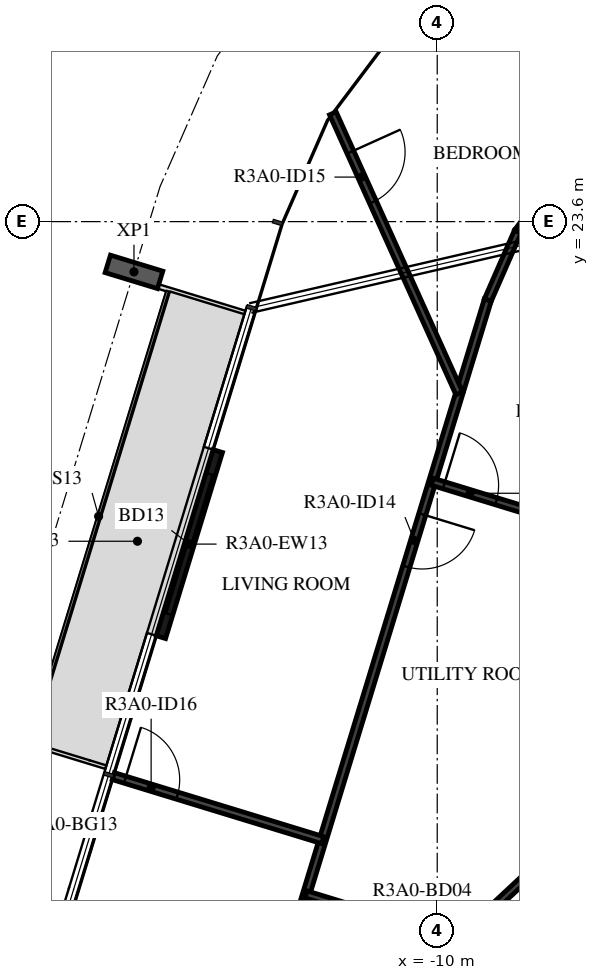
"""IFC4 building model, lengths in metres.
Left out: names, types, materials, properties, quantities, classifications, styles, units other than length and angle.
Written with IfcOpenShell. Run it as: python <this file> out.ifc"""

import sys

from ifc_helpers import new_model, si_unit, direction, frame, frame_2d, origin, origin_2d, place, context, subcontext, project, spatial, rectangle, i_section, extrude, element, fill, save


model = new_model("IFC4")
c1 = context("Model", 3, precision=1e-05, world=origin(), true_north=direction((0.0, 1.0)))
c2 = subcontext(c1, "Body", "Model", "MODEL_VIEW")
j1 = project(units=[si_unit("LENGTHUNIT", "METRE"), si_unit("PLANEANGLEUNIT", "RADIAN")], contexts=[c1])
p1 = place(None, origin())
s1 = spatial("IfcSite", under=j1, at=p1, CompositionType="ELEMENT")
p2 = place(p1, origin())
s2 = spatial("IfcBuilding", under=s1, at=p2, CompositionType="ELEMENT")
p3 = place(p2, frame((0.0, 0.0, 120.4)))
s3 = spatial("IfcBuildingStorey", under=s2, at=p3, CompositionType="ELEMENT", Elevation=120.4)
p4 = place(p3, frame((-14.987, 22.773, -0.38), z_axis=(0.0, 0.0, 1.0), x_axis=(0.29237190653, 0.956304694264, 0.0)))
e1 = element("IfcColumn", 1, at=p4, inside=s3, PredefinedType="COLUMN", context=c2, shape_type="SweptSolid", body=[
    extrude(i_section(OverallWidth=0.3, OverallDepth=0.9, WebThickness=0.019, FlangeThickness=0.035, FilletRadius=0.03, at=origin_2d()), origin(), (0.0, 0.0, 1.0), 3.5),
])
p5 = place(p3, frame((-13.609, 19.827, 0.0), z_axis=(0.0, 0.0, 1.0), x_axis=(-0.292348395078, -0.956311882126, 0.0)))
e2 = element("IfcWall", 2, at=p5, inside=s3, PredefinedType="STANDARD", context=c2, shape_type="SweptSolid", body=[
    extrude(rectangle(XDim=3.2, YDim=0.16, at=frame_2d((1.6, 0.0))), origin(), (0.0, 0.0, 1.0), 3.12),
])
p6 = place(p5, frame((0.4, 0.0, 0.0)))
e3 = element("IfcOpeningElement", 3, at=p6, cuts=e2, PredefinedType="OPENING", context=c2, shape_type="SweptSolid", body=[
    extrude(rectangle(XDim=2.4, YDim=2.4, at=frame_2d((1.2, 1.2))), frame((0.0, 0.09, 0.0), z_axis=(0.0, -1.0, 0.0), x_axis=(1.0, 0.0, 0.0)), (0.0, 0.0, 1.0), 0.18),
])
p7 = place(p3, frame((-6.659, 12.523, 0.0), z_axis=(0.0, 0.0, 1.0), x_axis=(-0.731350455479, -0.682001841105, 0.0)))
e4 = element("IfcWall", 4, at=p7, inside=s3, PredefinedType="STANDARD", context=c2, shape_type="SweptSolid", body=[
    extrude(rectangle(XDim=7.342, YDim=0.2, at=frame_2d((3.671, 0.0))), origin(), (0.0, 0.0, 1.0), 3.12),
])
p8 = place(p7, frame((4.2, 0.0, 0.0)))
e5 = element("IfcOpeningElement", 5, at=p8, cuts=e4, PredefinedType="OPENING", context=c2, shape_type="SweptSolid", body=[
    extrude(rectangle(XDim=1.0, YDim=2.1, at=frame_2d((0.5, 1.05))), frame((0.0, 0.11, 0.0), z_axis=(0.0, -1.0, 0.0), x_axis=(1.0, 0.0, 0.0)), (0.0, 0.0, 1.0), 0.22),
])
p9 = place(p3, frame((-7.388, 13.894, 0.0), z_axis=(0.0, 0.0, 1.0), x_axis=(-0.731357186721, -0.681994622729, 0.0)))
e6 = element("IfcWall", 6, at=p9, inside=s3, PredefinedType="PARTITIONING", context=c2, shape_type="SweptSolid", body=[
    extrude(rectangle(XDim=8.146, YDim=0.12, at=frame_2d((4.073, 0.0))), origin(), (0.0, 0.0, 1.0), 3.12),
])
p10 = place(p9, frame((3.509, 0.0, 0.0)))
e7 = element("IfcOpeningElement", 7, at=p10, cuts=e6, PredefinedType="OPENING", context=c2, shape_type="SweptSolid", body=[
    extrude(rectangle(XDim=0.8, YDim=2.1, at=frame_2d((0.4, 1.05))), frame((0.0, 0.07, 0.0), z_axis=(0.0, -1.0, 0.0), x_axis=(1.0, 0.0, 0.0)), (0.0, 0.0, 1.0), 0.14),
])
p11 = place(p3, frame((-8.065, 24.245, 0.0), z_axis=(0.0, 0.0, 1.0), x_axis=(-0.601959070304, -0.798526942363, 0.0)))
e8 = element("IfcWall", 8, at=p11, inside=s3, PredefinedType="PARTITIONING", context=c2, shape_type="SweptSolid", body=[
    extrude(rectangle(XDim=1.016, YDim=0.12, at=frame_2d((0.508, 0.0))), origin(), (0.0, 0.0, 1.0), 3.12),
])
p12 = place(p3, frame((-8.677, 23.433, 0.0), z_axis=(0.0, 0.0, 1.0), x_axis=(-0.401351130635, -0.915924270853, 0.0)))
e9 = element("IfcWall", 9, at=p12, inside=s3, PredefinedType="PARTITIONING", context=c2, shape_type="SweptSolid", body=[
    extrude(rectangle(XDim=1.227, YDim=0.12, at=frame_2d((0.614, 0.0))), origin(), (0.0, 0.0, 1.0), 3.12),
])
p13 = place(p3, frame((-9.169, 22.31, 0.0), z_axis=(0.0, 0.0, 1.0), x_axis=(-0.29236145486, -0.956307889601, 0.0)))
e10 = element("IfcWall", 10, at=p13, inside=s3, PredefinedType="PARTITIONING", context=c2, shape_type="SweptSolid", body=[
    extrude(rectangle(XDim=17.316, YDim=0.12, at=frame_2d((8.658, 0.0))), origin(), (0.0, 0.0, 1.0), 3.12),
])
p14 = place(p13, frame((3.683, 0.0, 0.0)))
e11 = element("IfcOpeningElement", 11, at=p14, cuts=e10, PredefinedType="OPENING", context=c2, shape_type="SweptSolid", body=[
    extrude(rectangle(XDim=0.9, YDim=2.1, at=frame_2d((0.45, 1.05))), frame((0.0, 0.07, 0.0), z_axis=(0.0, -1.0, 0.0), x_axis=(1.0, 0.0, 0.0)), (0.0, 0.0, 1.0), 0.14),
])
p15 = place(p3, frame((-10.082, 19.323, 0.0), z_axis=(0.0, 0.0, 1.0), x_axis=(0.956300011431, -0.292387222936, 0.0)))
e12 = element("IfcWall", 12, at=p15, inside=s3, PredefinedType="PARTITIONING", context=c2, shape_type="SweptSolid", body=[
    extrude(rectangle(XDim=6.324, YDim=0.12, at=frame_2d((3.162, 0.0))), origin(), (0.0, 0.0, 1.0), 3.12),
])
p16 = place(p15, frame((0.2, 0.0, 0.0)))
e13 = element("IfcOpeningElement", 13, at=p16, cuts=e12, PredefinedType="OPENING", context=c2, shape_type="SweptSolid", body=[
    extrude(rectangle(XDim=0.9, YDim=2.1, at=frame_2d((0.45, 1.05))), frame((0.0, 0.07, 0.0), z_axis=(0.0, -1.0, 0.0), x_axis=(1.0, 0.0, 0.0)), (0.0, 0.0, 1.0), 0.14),
])
p17 = place(p3, frame((-11.717, 25.381, 0.0), z_axis=(0.0, 0.0, 1.0), x_axis=(0.411493504767, -0.911412692217, 0.0)))
e14 = element("IfcWall", 14, at=p17, inside=s3, PredefinedType="PARTITIONING", context=c2, shape_type="SweptSolid", body=[
    extrude(rectangle(XDim=5.052, YDim=0.12, at=frame_2d((2.526, 0.0))), origin(), (0.0, 0.0, 1.0), 3.12),
])
p18 = place(p17, frame((0.7, 0.0, 0.0)))
e15 = element("IfcOpeningElement", 15, at=p18, cuts=e14, PredefinedType="OPENING", context=c2, shape_type="SweptSolid", body=[
    extrude(rectangle(XDim=0.9, YDim=2.1, at=frame_2d((0.45, 1.05))), frame((0.0, 0.07, 0.0), z_axis=(0.0, -1.0, 0.0), x_axis=(1.0, 0.0, 0.0)), (0.0, 0.0, 1.0), 0.14),
])
p19 = place(p3, frame((-12.157, 12.537, 0.0), z_axis=(0.0, 0.0, 1.0), x_axis=(0.956293441844, -0.292408708979, 0.0)))
e16 = element("IfcWall", 16, at=p19, inside=s3, PredefinedType="PARTITIONING", context=c2, shape_type="SweptSolid", body=[
    extrude(rectangle(XDim=2.609, YDim=0.12, at=frame_2d((1.305, 0.0))), origin(), (0.0, 0.0, 1.0), 3.12),
])
p20 = place(p3, frame((-15.327, 14.481, 0.0), z_axis=(0.0, 0.0, 1.0), x_axis=(0.956306810244, -0.292364985388, 0.0)))
e17 = element("IfcWall", 17, at=p20, inside=s3, PredefinedType="PARTITIONING", context=c2, shape_type="SweptSolid", body=[
    extrude(rectangle(XDim=3.6, YDim=0.12, at=frame_2d((1.8, 0.0))), origin(), (0.0, 0.0, 1.0), 2.73),
])
p21 = place(p20, frame((0.2, 0.0, 0.0)))
e18 = element("IfcOpeningElement", 18, at=p21, cuts=e17, PredefinedType="OPENING", context=c2, shape_type="SweptSolid", body=[
    extrude(rectangle(XDim=0.9, YDim=2.1, at=frame_2d((0.45, 1.05))), frame((0.0, 0.07, 0.0), z_axis=(0.0, -1.0, 0.0), x_axis=(1.0, 0.0, 0.0)), (0.0, 0.0, 1.0), 0.14),
])
p22 = place(p6, origin())
e19 = element("IfcDoor", 19, at=p22, inside=s3, OperationType="DOUBLE_DOOR_SLIDING", PredefinedType="DOOR", context=c2, shape_type="SweptSolid", body=[
    extrude(rectangle(XDim=2.4, YDim=2.4, at=frame_2d((1.2, 1.2))), frame((0.0, 0.025, 0.0), z_axis=(0.0, -1.0, 0.0), x_axis=(1.0, 0.0, 0.0)), (0.0, 0.0, 1.0), 0.05),
])
fill(e3, e19)
p23 = place(p16, origin())
e20 = element("IfcDoor", 20, at=p23, inside=s3, OperationType="SINGLE_SWING_LEFT", PredefinedType="DOOR", context=c2, shape_type="SweptSolid", body=[
    extrude(rectangle(XDim=0.9, YDim=2.1, at=frame_2d((0.45, 1.05))), frame((0.0, 0.025, 0.0), z_axis=(0.0, -1.0, 0.0), x_axis=(1.0, 0.0, 0.0)), (0.0, 0.0, 1.0), 0.05),
])
fill(e13, e20)
p24 = place(p14, origin())
e21 = element("IfcDoor", 21, at=p24, inside=s3, OperationType="SINGLE_SWING_LEFT", PredefinedType="DOOR", context=c2, shape_type="SweptSolid", body=[
    extrude(rectangle(XDim=0.9, YDim=2.1, at=frame_2d((0.45, 1.05))), frame((0.0, 0.025, 0.0), z_axis=(0.0, -1.0, 0.0), x_axis=(1.0, 0.0, 0.0)), (0.0, 0.0, 1.0), 0.05),
])
fill(e11, e21)
p25 = place(p18, origin())
e22 = element("IfcDoor", 22, at=p25, inside=s3, OperationType="SINGLE_SWING_LEFT", PredefinedType="DOOR", context=c2, shape_type="SweptSolid", body=[
    extrude(rectangle(XDim=0.9, YDim=2.1, at=frame_2d((0.45, 1.05))), frame((0.0, 0.025, 0.0), z_axis=(0.0, -1.0, 0.0), x_axis=(1.0, 0.0, 0.0)), (0.0, 0.0, 1.0), 0.05),
])
fill(e15, e22)
p26 = place(p21, origin())
e23 = element("IfcDoor", 23, at=p26, inside=s3, OperationType="SINGLE_SWING_RIGHT", PredefinedType="DOOR", context=c2, shape_type="SweptSolid", body=[
    extrude(rectangle(XDim=0.9, YDim=2.1, at=frame_2d((0.45, 1.05))), frame((0.0, 0.025, 0.0), z_axis=(0.0, -1.0, 0.0), x_axis=(1.0, 0.0, 0.0)), (0.0, 0.0, 1.0), 0.05),
])
fill(e18, e23)
save(model, sys.argv[1])
